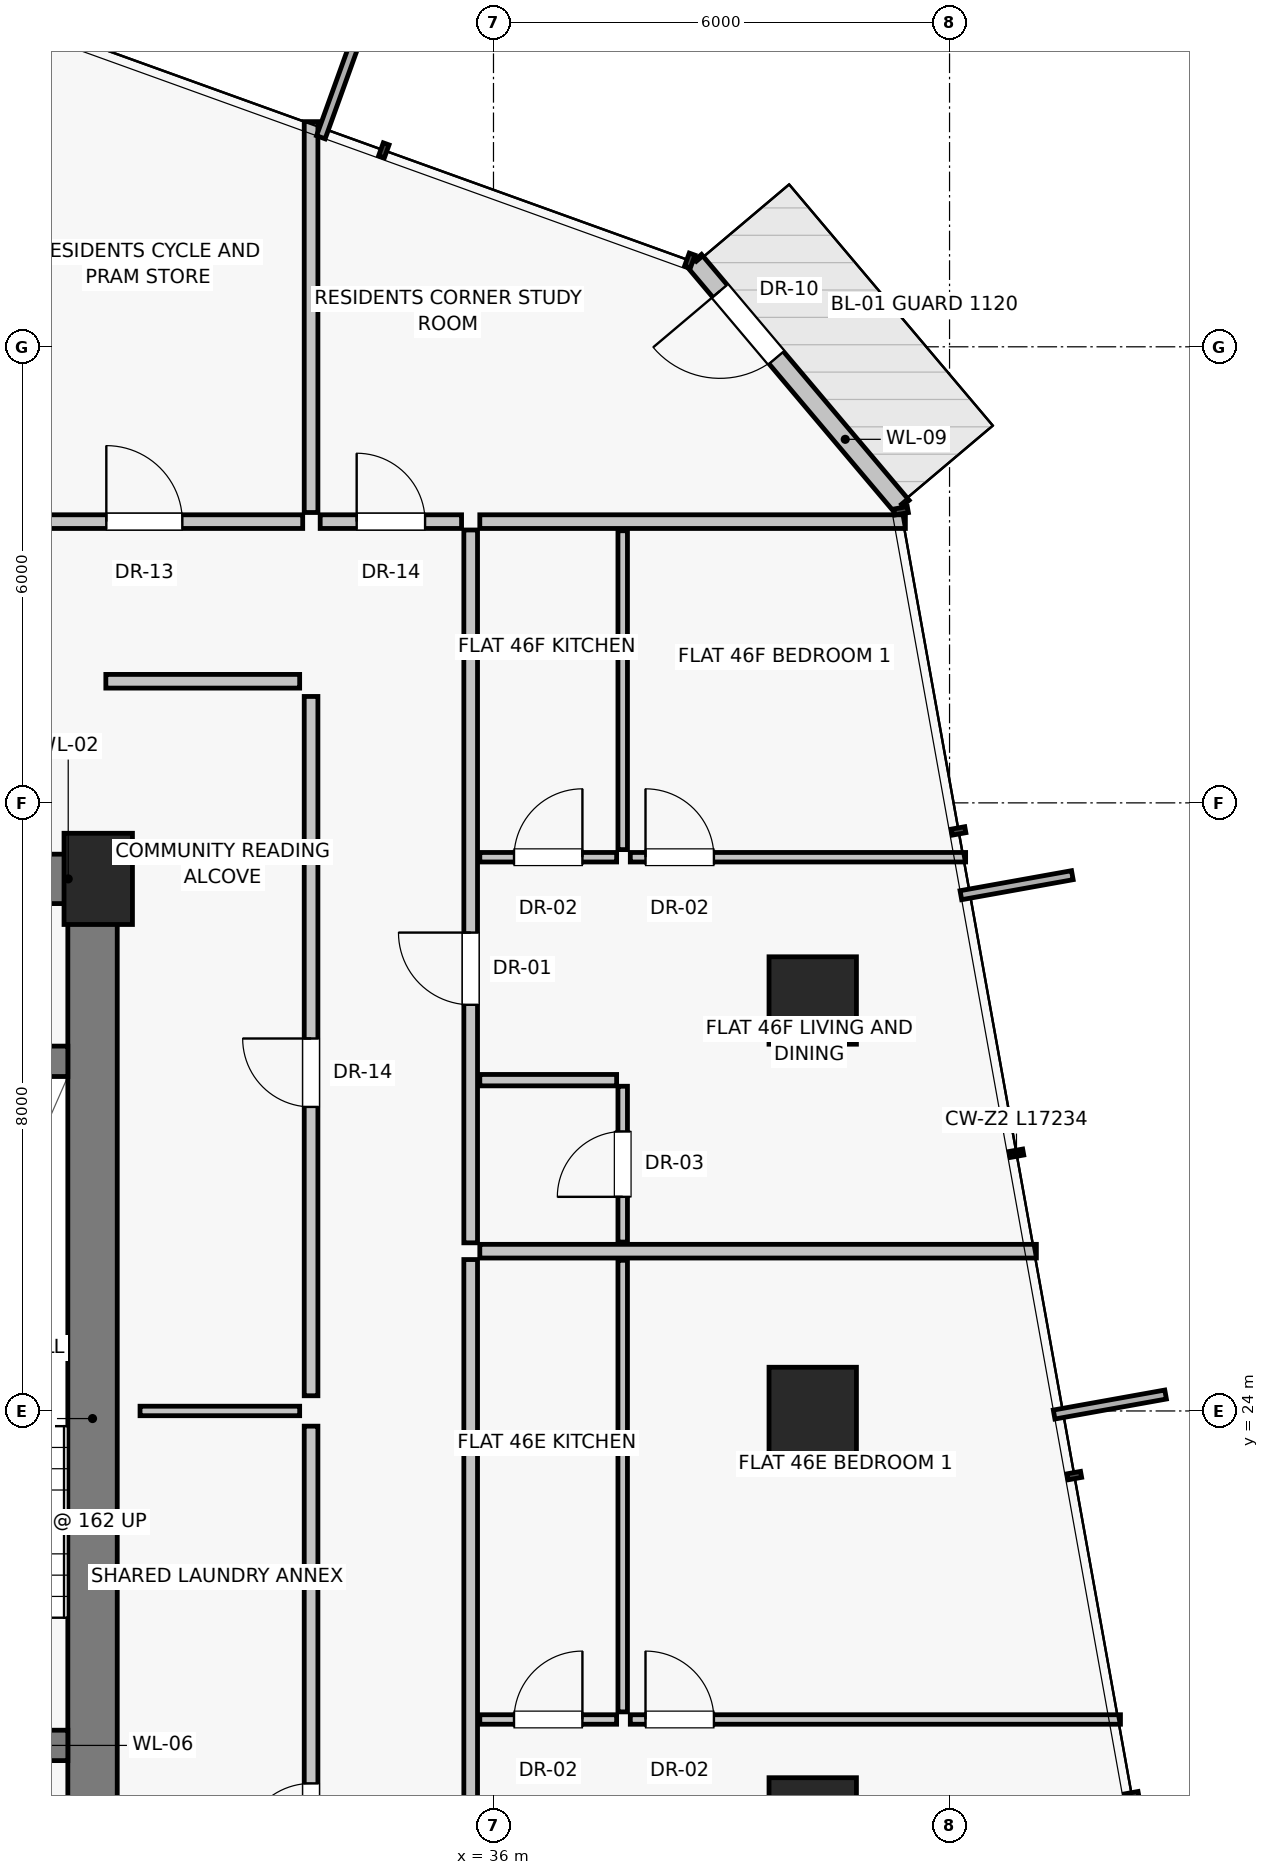
"""IFC4 building model, lengths in metres.
Left out: names, types, materials, properties, quantities, classifications, styles, units other than length and angle.
Written with IfcOpenShell. Run it as: python <this file> out.ifc"""

import sys

from ifc_helpers import new_model, si_unit, direction, frame, frame_2d, origin, origin_2d, place, context, subcontext, project, spatial, rectangle, extrude, source, transform, mapped, element, fill, save


model = new_model("IFC4")
c1 = context("Model", 3, precision=1e-05, world=origin(), true_north=direction((0.0, 1.0)))
c2 = subcontext(c1, "Body", "Model", "MODEL_VIEW")
j1 = project(units=[si_unit("LENGTHUNIT", "METRE"), si_unit("PLANEANGLEUNIT", "RADIAN")], contexts=[c1])
p1 = place(None, origin())
s1 = spatial("IfcSite", under=j1, at=p1, CompositionType="ELEMENT")
p2 = place(p1, origin())
s2 = spatial("IfcBuilding", under=s1, at=p2, CompositionType="ELEMENT")
p3 = place(p2, frame((0.0, 0.0, 163.05)))
s3 = spatial("IfcBuildingStorey", under=s2, at=p3, CompositionType="ELEMENT", Elevation=163.05)
p4 = place(p3, frame((30.8, 31.0, 0.0), z_axis=(0.0, 0.0, 1.0), x_axis=(1.0, 0.0, 0.0)))
e1 = element("IfcColumn", 1, at=p4, inside=s3, PredefinedType="PILASTER", context=c2, shape_type="SweptSolid", body=[
    extrude(rectangle(XDim=0.9, YDim=1.2, at=origin_2d()), origin(), (0.0, 0.0, 1.0), 3.25),
])
for number, where, z_axis, x_axis in (
    (2, (40.2, 18.6, 0.0), (0.0, 0.0, 1.0), (1.0, 0.0, 0.0)),
    (3, (40.2, 24.0, 0.0), (0.0, 0.0, 1.0), (1.0, 0.0, 0.0)),
    (4, (40.2, 29.4, 0.0), (0.0, 0.0, 1.0), (1.0, 0.0, 0.0)),
):
    element("IfcColumn", number, at=place(p3, frame(where, z_axis=z_axis, x_axis=x_axis)), inside=s3, PredefinedType="COLUMN", context=c2, shape_type="SweptSolid", body=[
        extrude(rectangle(XDim=1.15, YDim=1.15, at=origin_2d()), origin(), (0.0, 0.0, 1.0), 3.25),
    ])
p5 = place(p3, frame((41.373, 35.9, 0.0), z_axis=(0.0, 0.0, 1.0), x_axis=(-0.645202514013, 0.764011594095, 0.0)))
e5 = element("IfcWall", 5, at=p5, inside=s3, PredefinedType="SOLIDWALL", context=c2, shape_type="SweptSolid", body=[
    extrude(rectangle(XDim=4.233, YDim=0.25, at=frame_2d((2.117, 0.0))), origin(), (0.0, 0.0, 1.0), 3.0),
])
p6 = place(p5, frame((2.56, 0.0, 0.0)))
e6 = element("IfcOpeningElement", 6, at=p6, cuts=e5, PredefinedType="OPENING", context=c2, shape_type="SweptSolid", body=[
    extrude(rectangle(XDim=1.15, YDim=2.25, at=frame_2d((0.575, 1.125))), frame((0.0, 0.135, 0.0), z_axis=(0.0, -1.0, 0.0), x_axis=(1.0, 0.0, 0.0)), (0.0, 0.0, 1.0), 0.27),
])
p7 = place(p3, frame((30.725, 16.8, 0.0), z_axis=(0.0, 0.0, 1.0), x_axis=(0.0, 1.0, 0.0)))
e7 = element("IfcWall", 7, at=p7, inside=s3, PredefinedType="SHEAR", context=c2, shape_type="SweptSolid", body=[
    extrude(rectangle(XDim=14.2, YDim=0.65, at=frame_2d((7.1, 0.0))), origin(), (0.0, 0.0, 1.0), 3.0),
])
p8 = place(p3, frame((27.0, 31.0, 0.0), z_axis=(0.0, 0.0, 1.0), x_axis=(1.0, 0.0, 0.0)))
e8 = element("IfcWall", 8, at=p8, inside=s3, PredefinedType="SHEAR", context=c2, shape_type="SweptSolid", body=[
    extrude(rectangle(XDim=3.8, YDim=0.65, at=frame_2d((1.9, 0.0))), origin(), (0.0, 0.0, 1.0), 3.0),
])
p9 = place(p8, frame((0.45, 0.0, 0.0)))
e9 = element("IfcOpeningElement", 9, at=p9, cuts=e8, PredefinedType="OPENING", context=c2, shape_type="SweptSolid", body=[
    extrude(rectangle(XDim=0.86, YDim=2.01, at=frame_2d((0.43, 1.005))), frame((0.0, 0.335, 0.0), z_axis=(0.0, -1.0, 0.0), x_axis=(1.0, 0.0, 0.0)), (0.0, 0.0, 1.0), 0.67),
])
p10 = place(p8, frame((1.9, 0.0, 0.0)))
e10 = element("IfcOpeningElement", 10, at=p10, cuts=e8, PredefinedType="OPENING", context=c2, shape_type="SweptSolid", body=[
    extrude(rectangle(XDim=0.86, YDim=2.01, at=frame_2d((0.43, 1.005))), frame((0.0, 0.335, 0.0), z_axis=(0.0, -1.0, 0.0), x_axis=(1.0, 0.0, 0.0)), (0.0, 0.0, 1.0), 0.67),
])
p11 = place(p3, frame((27.0, 19.6, 0.0), z_axis=(0.0, 0.0, 1.0), x_axis=(1.0, 0.0, 0.0)))
e11 = element("IfcWall", 11, at=p11, inside=s3, PredefinedType="SHEAR", context=c2, shape_type="SweptSolid", body=[
    extrude(rectangle(XDim=3.4, YDim=0.4, at=frame_2d((1.7, 0.0))), origin(), (0.0, 0.0, 1.0), 3.0),
])
p12 = place(p11, frame((1.05, 0.0, 0.0)))
e12 = element("IfcOpeningElement", 12, at=p12, cuts=e11, PredefinedType="OPENING", context=c2, shape_type="SweptSolid", body=[
    extrude(rectangle(XDim=1.1, YDim=2.03, at=frame_2d((0.55, 1.015))), frame((0.0, 0.21, 0.0), z_axis=(0.0, -1.0, 0.0), x_axis=(1.0, 0.0, 0.0)), (0.0, 0.0, 1.0), 0.42),
])
p13 = place(p3, frame((27.0, 28.6, 0.0), z_axis=(0.0, 0.0, 1.0), x_axis=(1.0, 0.0, 0.0)))
e13 = element("IfcWall", 13, at=p13, inside=s3, PredefinedType="SHEAR", context=c2, shape_type="SweptSolid", body=[
    extrude(rectangle(XDim=3.4, YDim=0.4, at=frame_2d((1.7, 0.0))), origin(), (0.0, 0.0, 1.0), 3.0),
])
p14 = place(p3, frame((33.6, 14.4, 0.0), z_axis=(0.0, 0.0, 1.0), x_axis=(0.0, 1.0, 0.0)))
e14 = element("IfcWall", 14, at=p14, inside=s3, PredefinedType="PARTITIONING", context=c2, shape_type="SweptSolid", body=[
    extrude(rectangle(XDim=9.4, YDim=0.18, at=frame_2d((4.7, 0.0))), origin(), (0.0, 0.0, 1.0), 3.0),
])
p15 = place(p14, frame((3.8, 0.0, 0.0)))
e15 = element("IfcOpeningElement", 15, at=p15, cuts=e14, PredefinedType="OPENING", context=c2, shape_type="SweptSolid", body=[
    extrude(rectangle(XDim=0.9, YDim=2.01, at=frame_2d((0.45, 1.005))), frame((0.0, 0.1, 0.0), z_axis=(0.0, -1.0, 0.0), x_axis=(1.0, 0.0, 0.0)), (0.0, 0.0, 1.0), 0.2),
])
p16 = place(p3, frame((33.6, 24.2, 0.0), z_axis=(0.0, 0.0, 1.0), x_axis=(0.0, 1.0, 0.0)))
e16 = element("IfcWall", 16, at=p16, inside=s3, PredefinedType="PARTITIONING", context=c2, shape_type="SweptSolid", body=[
    extrude(rectangle(XDim=9.2, YDim=0.18, at=frame_2d((4.6, 0.0))), origin(), (0.0, 0.0, 1.0), 3.0),
])
p17 = place(p16, frame((3.8, 0.0, 0.0)))
e17 = element("IfcOpeningElement", 17, at=p17, cuts=e16, PredefinedType="OPENING", context=c2, shape_type="SweptSolid", body=[
    extrude(rectangle(XDim=0.9, YDim=2.01, at=frame_2d((0.45, 1.005))), frame((0.0, 0.1, 0.0), z_axis=(0.0, -1.0, 0.0), x_axis=(1.0, 0.0, 0.0)), (0.0, 0.0, 1.0), 0.2),
])
p18 = place(p3, frame((31.35, 24.0, 0.0), z_axis=(0.0, 0.0, 1.0), x_axis=(1.0, 0.0, 0.0)))
e18 = element("IfcWall", 18, at=p18, inside=s3, PredefinedType="PARTITIONING", context=c2, shape_type="SweptSolid", body=[
    extrude(rectangle(XDim=2.1, YDim=0.125, at=frame_2d((1.05, 0.0))), origin(), (0.0, 0.0, 1.0), 3.0),
])
p19 = place(p3, frame((30.9, 33.6, 0.0), z_axis=(0.0, 0.0, 1.0), x_axis=(1.0, 0.0, 0.0)))
e19 = element("IfcWall", 19, at=p19, inside=s3, PredefinedType="PARTITIONING", context=c2, shape_type="SweptSolid", body=[
    extrude(rectangle(XDim=2.55, YDim=0.18, at=frame_2d((1.275, 0.0))), origin(), (0.0, 0.0, 1.0), 3.0),
])
p20 = place(p3, frame((33.6, 35.82, 0.0), z_axis=(0.0, 0.0, 1.0), x_axis=(0.0, 1.0, 0.0)))
e20 = element("IfcWall", 20, at=p20, inside=s3, PredefinedType="PARTITIONING", context=c2, shape_type="SweptSolid", body=[
    extrude(rectangle(XDim=5.142, YDim=0.18, at=frame_2d((2.571, 0.0))), origin(), (0.0, 0.0, 1.0), 3.0),
])
p21 = place(p3, frame((29.323, 35.7, 0.0), z_axis=(0.0, 0.0, 1.0), x_axis=(1.0, 0.0, 0.0)))
e21 = element("IfcWall", 21, at=p21, inside=s3, PredefinedType="PARTITIONING", context=c2, shape_type="SweptSolid", body=[
    extrude(rectangle(XDim=4.167, YDim=0.18, at=frame_2d((2.083, 0.0))), origin(), (0.0, 0.0, 1.0), 2.58),
])
p22 = place(p21, frame((1.583, 0.0, 0.0)))
e22 = element("IfcOpeningElement", 22, at=p22, cuts=e21, PredefinedType="OPENING", context=c2, shape_type="SweptSolid", body=[
    extrude(rectangle(XDim=1.0, YDim=2.01, at=frame_2d((0.5, 1.005))), frame((0.0, 0.1, 0.0), z_axis=(0.0, -1.0, 0.0), x_axis=(1.0, 0.0, 0.0)), (0.0, 0.0, 1.0), 0.2),
])
p23 = place(p3, frame((35.82, 35.7, 0.0), z_axis=(0.0, 0.0, 1.0), x_axis=(1.0, 0.0, 0.0)))
e23 = element("IfcWall", 23, at=p23, inside=s3, PredefinedType="PARTITIONING", context=c2, shape_type="SweptSolid", body=[
    extrude(rectangle(XDim=5.599, YDim=0.18, at=frame_2d((2.799, 0.0))), origin(), (0.0, 0.0, 1.0), 3.0),
])
p24 = place(p3, frame((35.7, 12.21, 0.0), z_axis=(0.0, 0.0, 1.0), x_axis=(0.0, 1.0, 0.0)))
e24 = element("IfcWall", 24, at=p24, inside=s3, PredefinedType="PARTITIONING", context=c2, shape_type="SweptSolid", body=[
    extrude(rectangle(XDim=13.782, YDim=0.18, at=frame_2d((6.891, 0.0))), origin(), (0.0, 0.0, 1.0), 2.58),
])
p25 = place(p24, frame((4.46, 0.0, 0.0)))
e25 = element("IfcOpeningElement", 25, at=p25, cuts=e24, PredefinedType="OPENING", context=c2, shape_type="SweptSolid", body=[
    extrude(rectangle(XDim=0.95, YDim=2.02, at=frame_2d((0.475, 1.01))), frame((0.0, 0.1, 0.0), z_axis=(0.0, -1.0, 0.0), x_axis=(1.0, 0.0, 0.0)), (0.0, 0.0, 1.0), 0.2),
])
p26 = place(p3, frame((35.82, 19.941, 0.0), z_axis=(0.0, 0.0, 1.0), x_axis=(1.0, 0.0, 0.0)))
e26 = element("IfcWall", 26, at=p26, inside=s3, PredefinedType="PARTITIONING", context=c2, shape_type="SweptSolid", body=[
    extrude(rectangle(XDim=1.8, YDim=0.125, at=frame_2d((0.9, 0.0))), origin(), (0.0, 0.0, 1.0), 3.0),
])
p27 = place(p26, frame((0.45, 0.0, 0.0)))
e27 = element("IfcOpeningElement", 27, at=p27, cuts=e26, PredefinedType="OPENING", context=c2, shape_type="SweptSolid", body=[
    extrude(rectangle(XDim=0.9, YDim=2.01, at=frame_2d((0.45, 1.005))), frame((0.0, 0.073, 0.0), z_axis=(0.0, -1.0, 0.0), x_axis=(1.0, 0.0, 0.0)), (0.0, 0.0, 1.0), 0.145),
])
p28 = place(p3, frame((37.7, 20.041, 0.0), z_axis=(0.0, 0.0, 1.0), x_axis=(0.0, 1.0, 0.0)))
e28 = element("IfcWall", 28, at=p28, inside=s3, PredefinedType="PARTITIONING", context=c2, shape_type="SweptSolid", body=[
    extrude(rectangle(XDim=5.941, YDim=0.125, at=frame_2d((2.97, 0.0))), origin(), (0.0, 0.0, 1.0), 3.0),
])
p29 = place(p3, frame((37.8, 19.941, 0.0), z_axis=(0.0, 0.0, 1.0), x_axis=(1.0, 0.0, 0.0)))
e29 = element("IfcWall", 29, at=p29, inside=s3, PredefinedType="PARTITIONING", context=c2, shape_type="SweptSolid", body=[
    extrude(rectangle(XDim=6.448, YDim=0.125, at=frame_2d((3.224, 0.0))), origin(), (0.0, 0.0, 1.0), 3.0),
])
p30 = place(p29, frame((0.2, 0.0, 0.0)))
e30 = element("IfcOpeningElement", 30, at=p30, cuts=e29, PredefinedType="OPENING", context=c2, shape_type="SweptSolid", body=[
    extrude(rectangle(XDim=0.9, YDim=2.01, at=frame_2d((0.45, 1.005))), frame((0.0, 0.073, 0.0), z_axis=(0.0, -1.0, 0.0), x_axis=(1.0, 0.0, 0.0)), (0.0, 0.0, 1.0), 0.145),
])
p31 = place(p3, frame((35.82, 26.102, 0.0), z_axis=(0.0, 0.0, 1.0), x_axis=(1.0, 0.0, 0.0)))
e31 = element("IfcWall", 31, at=p31, inside=s3, PredefinedType="PARTITIONING", context=c2, shape_type="SweptSolid", body=[
    extrude(rectangle(XDim=7.322, YDim=0.18, at=frame_2d((3.661, 0.0))), origin(), (0.0, 0.0, 1.0), 3.0),
])
p32 = place(p3, frame((35.7, 26.212, 0.0), z_axis=(0.0, 0.0, 1.0), x_axis=(0.0, 1.0, 0.0)))
e32 = element("IfcWall", 32, at=p32, inside=s3, PredefinedType="PARTITIONING", context=c2, shape_type="SweptSolid", body=[
    extrude(rectangle(XDim=9.378, YDim=0.18, at=frame_2d((4.689, 0.0))), origin(), (0.0, 0.0, 1.0), 2.58),
])
p33 = place(p32, frame((3.132, 0.0, 0.0)))
e33 = element("IfcOpeningElement", 33, at=p33, cuts=e32, PredefinedType="OPENING", context=c2, shape_type="SweptSolid", body=[
    extrude(rectangle(XDim=0.95, YDim=2.02, at=frame_2d((0.475, 1.01))), frame((0.0, 0.1, 0.0), z_axis=(0.0, -1.0, 0.0), x_axis=(1.0, 0.0, 0.0)), (0.0, 0.0, 1.0), 0.2),
])
p34 = place(p3, frame((35.82, 28.352, 0.0), z_axis=(0.0, 0.0, 1.0), x_axis=(1.0, 0.0, 0.0)))
e34 = element("IfcWall", 34, at=p34, inside=s3, PredefinedType="PARTITIONING", context=c2, shape_type="SweptSolid", body=[
    extrude(rectangle(XDim=1.8, YDim=0.15, at=frame_2d((0.9, 0.0))), origin(), (0.0, 0.0, 1.0), 3.0),
])
p35 = place(p3, frame((37.7, 26.222, 0.0), z_axis=(0.0, 0.0, 1.0), x_axis=(0.0, 1.0, 0.0)))
e35 = element("IfcWall", 35, at=p35, inside=s3, PredefinedType="PARTITIONING", context=c2, shape_type="SweptSolid", body=[
    extrude(rectangle(XDim=2.05, YDim=0.125, at=frame_2d((1.025, 0.0))), origin(), (0.0, 0.0, 1.0), 3.0),
])
p36 = place(p35, frame((0.595, 0.0, 0.0)))
e36 = element("IfcOpeningElement", 36, at=p36, cuts=e35, PredefinedType="OPENING", context=c2, shape_type="SweptSolid", body=[
    extrude(rectangle(XDim=0.86, YDim=2.01, at=frame_2d((0.43, 1.005))), frame((0.0, 0.073, 0.0), z_axis=(0.0, -1.0, 0.0), x_axis=(1.0, 0.0, 0.0)), (0.0, 0.0, 1.0), 0.145),
])
p37 = place(p3, frame((35.82, 31.285, 0.0), z_axis=(0.0, 0.0, 1.0), x_axis=(1.0, 0.0, 0.0)))
e37 = element("IfcWall", 37, at=p37, inside=s3, PredefinedType="PARTITIONING", context=c2, shape_type="SweptSolid", body=[
    extrude(rectangle(XDim=1.8, YDim=0.125, at=frame_2d((0.9, 0.0))), origin(), (0.0, 0.0, 1.0), 3.0),
])
p38 = place(p37, frame((0.45, 0.0, 0.0)))
e38 = element("IfcOpeningElement", 38, at=p38, cuts=e37, PredefinedType="OPENING", context=c2, shape_type="SweptSolid", body=[
    extrude(rectangle(XDim=0.9, YDim=2.01, at=frame_2d((0.45, 1.005))), frame((0.0, 0.073, 0.0), z_axis=(0.0, -1.0, 0.0), x_axis=(1.0, 0.0, 0.0)), (0.0, 0.0, 1.0), 0.145),
])
p39 = place(p3, frame((37.7, 31.385, 0.0), z_axis=(0.0, 0.0, 1.0), x_axis=(0.0, 1.0, 0.0)))
e39 = element("IfcWall", 39, at=p39, inside=s3, PredefinedType="PARTITIONING", context=c2, shape_type="SweptSolid", body=[
    extrude(rectangle(XDim=4.195, YDim=0.125, at=frame_2d((2.098, 0.0))), origin(), (0.0, 0.0, 1.0), 3.0),
])
p40 = place(p3, frame((37.8, 31.285, 0.0), z_axis=(0.0, 0.0, 1.0), x_axis=(1.0, 0.0, 0.0)))
e40 = element("IfcWall", 40, at=p40, inside=s3, PredefinedType="PARTITIONING", context=c2, shape_type="SweptSolid", body=[
    extrude(rectangle(XDim=4.412, YDim=0.125, at=frame_2d((2.206, 0.0))), origin(), (0.0, 0.0, 1.0), 3.0),
])
p41 = place(p40, frame((0.2, 0.0, 0.0)))
e41 = element("IfcOpeningElement", 41, at=p41, cuts=e40, PredefinedType="OPENING", context=c2, shape_type="SweptSolid", body=[
    extrude(rectangle(XDim=0.9, YDim=2.01, at=frame_2d((0.45, 1.005))), frame((0.0, 0.073, 0.0), z_axis=(0.0, -1.0, 0.0), x_axis=(1.0, 0.0, 0.0)), (0.0, 0.0, 1.0), 0.145),
])
p42 = place(p3, frame((33.72, 35.7, 0.0), z_axis=(0.0, 0.0, 1.0), x_axis=(1.0, 0.0, 0.0)))
e42 = element("IfcWall", 42, at=p42, inside=s3, PredefinedType="PARTITIONING", context=c2, shape_type="SweptSolid", body=[
    extrude(rectangle(XDim=1.86, YDim=0.18, at=frame_2d((0.93, 0.0))), origin(), (0.0, 0.0, 1.0), 3.0),
])
p43 = place(p42, frame((0.48, 0.0, 0.0)))
e43 = element("IfcOpeningElement", 43, at=p43, cuts=e42, PredefinedType="OPENING", context=c2, shape_type="SweptSolid", body=[
    extrude(rectangle(XDim=0.9, YDim=2.01, at=frame_2d((0.45, 1.005))), frame((0.0, 0.1, 0.0), z_axis=(0.0, -1.0, 0.0), x_axis=(1.0, 0.0, 0.0)), (0.0, 0.0, 1.0), 0.2),
])
m1 = source(origin(), c2, "Body", "SweptSolid", [
    extrude(rectangle(XDim=1.15, YDim=2.25, at=frame_2d((0.575, 1.125))), frame((0.0, 0.025, 0.0), z_axis=(0.0, -1.0, 0.0), x_axis=(1.0, 0.0, 0.0)), (0.0, 0.0, 1.0), 0.05),
])
p44 = place(p6, frame((1.15, 0.0, 0.0), z_axis=(0.0, 0.0, 1.0), x_axis=(-1.0, 0.0, 0.0)))
e44 = element("IfcDoor", 44, at=p44, inside=s3, OperationType="SINGLE_SWING_RIGHT", PredefinedType="DOOR", context=c2, shape_type="MappedRepresentation", body=[
    mapped(m1, transform((0.0, 0.0, 0.0), scale=1.0)),
])
fill(e6, e44)
m2 = source(origin(), c2, "Body", "SweptSolid", [
    extrude(rectangle(XDim=0.9, YDim=2.01, at=frame_2d((0.45, 1.005))), frame((0.0, 0.025, 0.0), z_axis=(0.0, -1.0, 0.0), x_axis=(1.0, 0.0, 0.0)), (0.0, 0.0, 1.0), 0.05),
])
p45 = place(p15, origin())
e45 = element("IfcDoor", 45, at=p45, inside=s3, OperationType="SINGLE_SWING_LEFT", PredefinedType="DOOR", context=c2, shape_type="MappedRepresentation", body=[
    mapped(m2, transform((0.0, 0.0, 0.0), scale=1.0)),
])
fill(e15, e45)
p46 = place(p17, origin())
e46 = element("IfcDoor", 46, at=p46, inside=s3, OperationType="SINGLE_SWING_RIGHT", PredefinedType="DOOR", context=c2, shape_type="MappedRepresentation", body=[
    mapped(m2, transform((0.0, 0.0, 0.0), scale=1.0)),
])
fill(e17, e46)
m3 = source(origin(), c2, "Body", "SweptSolid", [
    extrude(rectangle(XDim=1.0, YDim=2.01, at=frame_2d((0.5, 1.005))), frame((0.0, 0.025, 0.0), z_axis=(0.0, -1.0, 0.0), x_axis=(1.0, 0.0, 0.0)), (0.0, 0.0, 1.0), 0.05),
])
p47 = place(p22, origin())
e47 = element("IfcDoor", 47, at=p47, inside=s3, OperationType="SINGLE_SWING_LEFT", PredefinedType="DOOR", context=c2, shape_type="MappedRepresentation", body=[
    mapped(m3, transform((0.0, 0.0, 0.0), scale=1.0)),
])
fill(e22, e47)
p48 = place(p27, origin())
e48 = element("IfcDoor", 48, at=p48, inside=s3, OperationType="SINGLE_SWING_RIGHT", PredefinedType="DOOR", context=c2, shape_type="MappedRepresentation", body=[
    mapped(m2, transform((0.0, 0.0, 0.0), scale=1.0)),
])
fill(e27, e48)
p49 = place(p30, origin())
e49 = element("IfcDoor", 49, at=p49, inside=s3, OperationType="SINGLE_SWING_LEFT", PredefinedType="DOOR", context=c2, shape_type="MappedRepresentation", body=[
    mapped(m2, transform((0.0, 0.0, 0.0), scale=1.0)),
])
fill(e30, e49)
m4 = source(origin(), c2, "Body", "SweptSolid", [
    extrude(rectangle(XDim=0.95, YDim=2.02, at=frame_2d((0.475, 1.01))), frame((0.0, 0.025, 0.0), z_axis=(0.0, -1.0, 0.0), x_axis=(1.0, 0.0, 0.0)), (0.0, 0.0, 1.0), 0.05),
])
p50 = place(p33, origin())
e50 = element("IfcDoor", 50, at=p50, inside=s3, OperationType="SINGLE_SWING_RIGHT", PredefinedType="DOOR", context=c2, shape_type="MappedRepresentation", body=[
    mapped(m4, transform((0.0, 0.0, 0.0), scale=1.0)),
])
fill(e33, e50)
m5 = source(origin(), c2, "Body", "SweptSolid", [
    extrude(rectangle(XDim=0.86, YDim=2.01, at=frame_2d((0.43, 1.005))), frame((0.0, 0.025, 0.0), z_axis=(0.0, -1.0, 0.0), x_axis=(1.0, 0.0, 0.0)), (0.0, 0.0, 1.0), 0.05),
])
p51 = place(p36, origin())
e51 = element("IfcDoor", 51, at=p51, inside=s3, OperationType="SINGLE_SWING_LEFT", PredefinedType="DOOR", context=c2, shape_type="MappedRepresentation", body=[
    mapped(m5, transform((0.0, 0.0, 0.0), scale=1.0)),
])
fill(e36, e51)
p52 = place(p38, origin())
e52 = element("IfcDoor", 52, at=p52, inside=s3, OperationType="SINGLE_SWING_RIGHT", PredefinedType="DOOR", context=c2, shape_type="MappedRepresentation", body=[
    mapped(m2, transform((0.0, 0.0, 0.0), scale=1.0)),
])
fill(e38, e52)
p53 = place(p41, origin())
e53 = element("IfcDoor", 53, at=p53, inside=s3, OperationType="SINGLE_SWING_LEFT", PredefinedType="DOOR", context=c2, shape_type="MappedRepresentation", body=[
    mapped(m2, transform((0.0, 0.0, 0.0), scale=1.0)),
])
fill(e41, e53)
p54 = place(p43, origin())
e54 = element("IfcDoor", 54, at=p54, inside=s3, OperationType="SINGLE_SWING_LEFT", PredefinedType="DOOR", context=c2, shape_type="MappedRepresentation", body=[
    mapped(m2, transform((0.0, 0.0, 0.0), scale=1.0)),
])
fill(e43, e54)
save(model, sys.argv[1])
